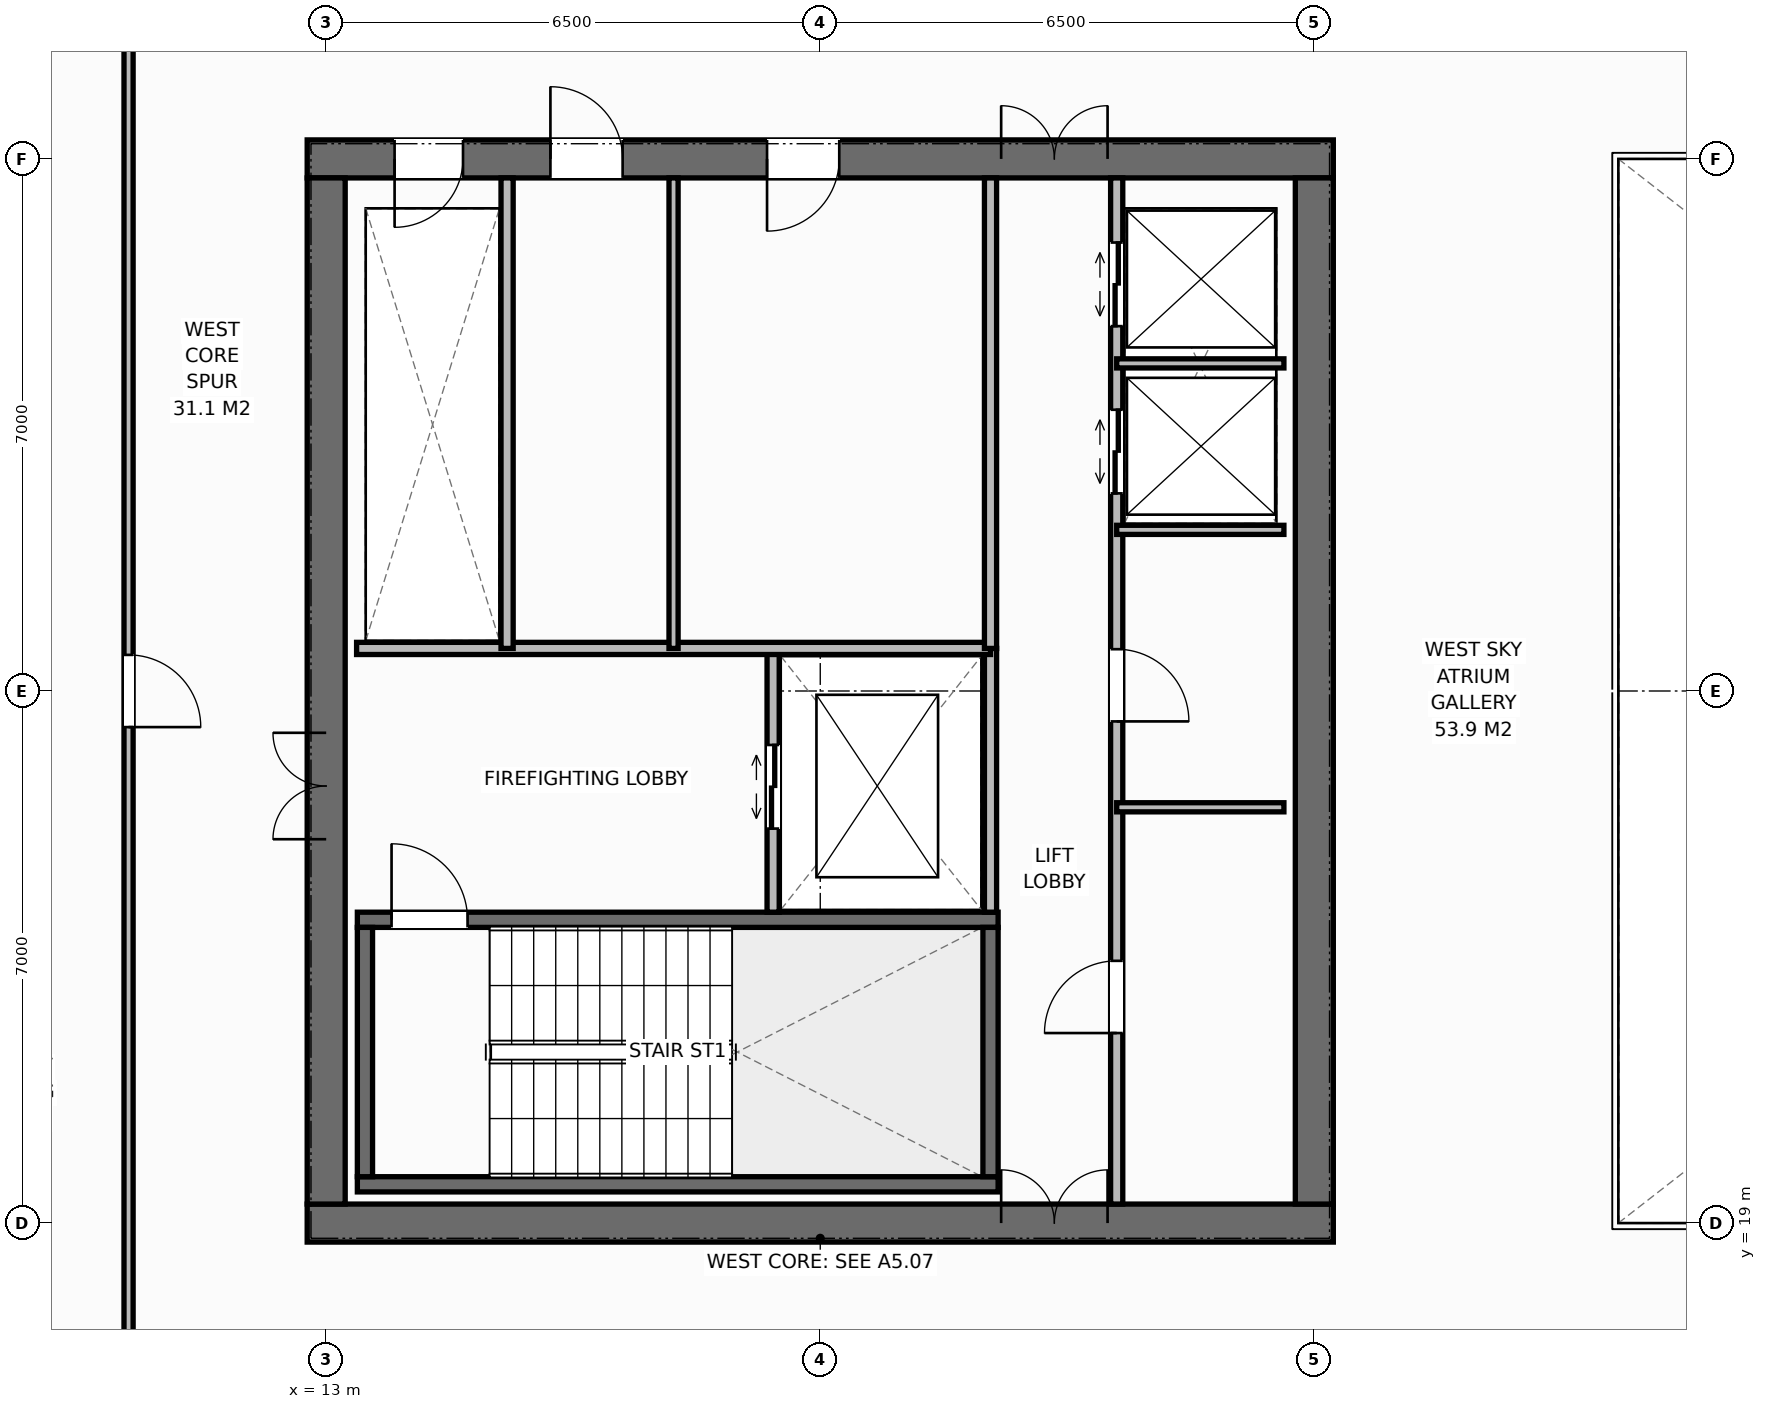
"""IFC4 building model, lengths in metres.
Left out: names, types, materials, properties, quantities, classifications, styles, units other than length and angle.
Written with IfcOpenShell. Run it as: python <this file> out.ifc"""

import sys

from ifc_helpers import new_model, si_unit, direction, frame, frame_2d, origin, place, context, subcontext, project, spatial, rectangle, extrude, element, fill, save


model = new_model("IFC4")
c1 = context("Model", 3, precision=1e-05, world=origin(), true_north=direction((0.0, 1.0)))
c2 = subcontext(c1, "Body", "Model", "MODEL_VIEW")
j1 = project(units=[si_unit("LENGTHUNIT", "METRE"), si_unit("PLANEANGLEUNIT", "RADIAN")], contexts=[c1])
p1 = place(None, origin())
s1 = spatial("IfcSite", under=j1, at=p1, CompositionType="ELEMENT")
p2 = place(p1, origin())
s2 = spatial("IfcBuilding", under=s1, at=p2, CompositionType="ELEMENT")
p3 = place(p2, frame((0.0, 0.0, 306.4)))
s3 = spatial("IfcBuildingStorey", under=s2, at=p3, CompositionType="ELEMENT", Elevation=306.4)
p4 = place(p3, frame((12.75, 19.0, 0.0), z_axis=(0.0, 0.0, 1.0), x_axis=(1.0, 0.0, 0.0)))
e1 = element("IfcWall", 1, at=p4, inside=s3, PredefinedType="SHEAR", context=c2, shape_type="SweptSolid", body=[
    extrude(rectangle(XDim=13.5, YDim=0.5, at=frame_2d((6.75, 0.0))), origin(), (0.0, 0.0, 1.0), 4.0),
])
p5 = place(p4, frame((9.13, 0.0, 0.0)))
e2 = element("IfcOpeningElement", 2, at=p5, cuts=e1, PredefinedType="OPENING", context=c2, shape_type="SweptSolid", body=[
    extrude(rectangle(XDim=1.4, YDim=2.2, at=frame_2d((0.7, 1.1))), frame((0.0, 0.26, 0.0), z_axis=(0.0, -1.0, 0.0), x_axis=(1.0, 0.0, 0.0)), (0.0, 0.0, 1.0), 0.52),
])
p6 = place(p3, frame((12.75, 33.0, 0.0), z_axis=(0.0, 0.0, 1.0), x_axis=(1.0, 0.0, 0.0)))
e3 = element("IfcWall", 3, at=p6, inside=s3, PredefinedType="SHEAR", context=c2, shape_type="SweptSolid", body=[
    extrude(rectangle(XDim=13.5, YDim=0.5, at=frame_2d((6.75, 0.0))), origin(), (0.0, 0.0, 1.0), 4.0),
])
p7 = place(p6, frame((1.15, 0.0, 0.0)))
e4 = element("IfcOpeningElement", 4, at=p7, cuts=e3, PredefinedType="OPENING", context=c2, shape_type="SweptSolid", body=[
    extrude(rectangle(XDim=0.9, YDim=2.15, at=frame_2d((0.45, 1.075))), frame((0.0, 0.26, 0.0), z_axis=(0.0, -1.0, 0.0), x_axis=(1.0, 0.0, 0.0)), (0.0, 0.0, 1.0), 0.52),
])
p8 = place(p6, frame((3.2, 0.0, 0.0)))
e5 = element("IfcOpeningElement", 5, at=p8, cuts=e3, PredefinedType="OPENING", context=c2, shape_type="SweptSolid", body=[
    extrude(rectangle(XDim=0.95, YDim=2.15, at=frame_2d((0.475, 1.075))), frame((0.0, 0.26, 0.0), z_axis=(0.0, -1.0, 0.0), x_axis=(1.0, 0.0, 0.0)), (0.0, 0.0, 1.0), 0.52),
])
p9 = place(p6, frame((6.05, 0.0, 0.0)))
e6 = element("IfcOpeningElement", 6, at=p9, cuts=e3, PredefinedType="OPENING", context=c2, shape_type="SweptSolid", body=[
    extrude(rectangle(XDim=0.95, YDim=2.15, at=frame_2d((0.475, 1.075))), frame((0.0, 0.26, 0.0), z_axis=(0.0, -1.0, 0.0), x_axis=(1.0, 0.0, 0.0)), (0.0, 0.0, 1.0), 0.52),
])
p10 = place(p6, frame((9.13, 0.0, 0.0)))
e7 = element("IfcOpeningElement", 7, at=p10, cuts=e3, PredefinedType="OPENING", context=c2, shape_type="SweptSolid", body=[
    extrude(rectangle(XDim=1.4, YDim=2.2, at=frame_2d((0.7, 1.1))), frame((0.0, 0.26, 0.0), z_axis=(0.0, -1.0, 0.0), x_axis=(1.0, 0.0, 0.0)), (0.0, 0.0, 1.0), 0.52),
])
p11 = place(p3, frame((13.0, 19.25, 0.0), z_axis=(0.0, 0.0, 1.0), x_axis=(0.0, 1.0, 0.0)))
e8 = element("IfcWall", 8, at=p11, inside=s3, PredefinedType="SHEAR", context=c2, shape_type="SweptSolid", body=[
    extrude(rectangle(XDim=13.5, YDim=0.5, at=frame_2d((6.75, 0.0))), origin(), (0.0, 0.0, 1.0), 4.0),
])
p12 = place(p11, frame((4.8, 0.0, 0.0)))
e9 = element("IfcOpeningElement", 9, at=p12, cuts=e8, PredefinedType="OPENING", context=c2, shape_type="SweptSolid", body=[
    extrude(rectangle(XDim=1.4, YDim=2.2, at=frame_2d((0.7, 1.1))), frame((0.0, 0.26, 0.0), z_axis=(0.0, -1.0, 0.0), x_axis=(1.0, 0.0, 0.0)), (0.0, 0.0, 1.0), 0.52),
])
p13 = place(p3, frame((26.0, 19.25, 0.0), z_axis=(0.0, 0.0, 1.0), x_axis=(0.0, 1.0, 0.0)))
e10 = element("IfcWall", 10, at=p13, inside=s3, PredefinedType="SHEAR", context=c2, shape_type="SweptSolid", body=[
    extrude(rectangle(XDim=13.5, YDim=0.5, at=frame_2d((6.75, 0.0))), origin(), (0.0, 0.0, 1.0), 4.0),
])
p14 = place(p3, frame((13.41, 19.51, 0.0), z_axis=(0.0, 0.0, 1.0), x_axis=(1.0, 0.0, 0.0)))
e11 = element("IfcWall", 11, at=p14, inside=s3, PredefinedType="SHEAR", context=c2, shape_type="SweptSolid", body=[
    extrude(rectangle(XDim=8.43, YDim=0.2, at=frame_2d((4.215, 0.0))), origin(), (0.0, 0.0, 1.0), 4.0),
])
p15 = place(p3, frame((13.41, 22.99, 0.0), z_axis=(0.0, 0.0, 1.0), x_axis=(1.0, 0.0, 0.0)))
e12 = element("IfcWall", 12, at=p15, inside=s3, PredefinedType="SHEAR", context=c2, shape_type="SweptSolid", body=[
    extrude(rectangle(XDim=8.43, YDim=0.2, at=frame_2d((4.215, 0.0))), origin(), (0.0, 0.0, 1.0), 4.0),
])
p16 = place(p15, frame((0.45, 0.0, 0.0)))
e13 = element("IfcOpeningElement", 13, at=p16, cuts=e12, PredefinedType="OPENING", context=c2, shape_type="SweptSolid", body=[
    extrude(rectangle(XDim=1.0, YDim=2.15, at=frame_2d((0.5, 1.075))), frame((0.0, 0.11, 0.0), z_axis=(0.0, -1.0, 0.0), x_axis=(1.0, 0.0, 0.0)), (0.0, 0.0, 1.0), 0.22),
])
for number, where, z_axis, x_axis in (
    (14, (13.51, 19.61, 0.0), (0.0, 0.0, 1.0), (0.0, 1.0, 0.0)),
    (15, (21.74, 19.61, 0.0), (0.0, 0.0, 1.0), (0.0, 1.0, 0.0)),
):
    element("IfcWall", number, at=place(p3, frame(where, z_axis=z_axis, x_axis=x_axis)), inside=s3, PredefinedType="SHEAR", context=c2, shape_type="SweptSolid", body=[
        extrude(rectangle(XDim=3.28, YDim=0.2, at=frame_2d((1.64, 0.0))), origin(), (0.0, 0.0, 1.0), 4.0),
    ])
p17 = place(p3, frame((21.74, 23.09, 0.0), z_axis=(0.0, 0.0, 1.0), x_axis=(0.0, 1.0, 0.0)))
e16 = element("IfcWall", 16, at=p17, inside=s3, PredefinedType="STANDARD", context=c2, shape_type="SweptSolid", body=[
    extrude(rectangle(XDim=3.47, YDim=0.16, at=frame_2d((1.735, 0.0))), origin(), (0.0, 0.0, 1.0), 3.72),
])
p18 = place(p3, frame((18.88, 23.09, 0.0), z_axis=(0.0, 0.0, 1.0), x_axis=(0.0, 1.0, 0.0)))
e17 = element("IfcWall", 17, at=p18, inside=s3, PredefinedType="STANDARD", context=c2, shape_type="SweptSolid", body=[
    extrude(rectangle(XDim=3.47, YDim=0.16, at=frame_2d((1.735, 0.0))), origin(), (0.0, 0.0, 1.0), 3.72),
])
p19 = place(p18, frame((1.1, 0.0, 0.0)))
e18 = element("IfcOpeningElement", 18, at=p19, cuts=e17, PredefinedType="OPENING", context=c2, shape_type="SweptSolid", body=[
    extrude(rectangle(XDim=1.1, YDim=2.2, at=frame_2d((0.55, 1.1))), frame((0.0, 0.09, 0.0), z_axis=(0.0, -1.0, 0.0), x_axis=(1.0, 0.0, 0.0)), (0.0, 0.0, 1.0), 0.18),
])
p20 = place(p3, frame((13.4, 26.56, 0.0), z_axis=(0.0, 0.0, 1.0), x_axis=(1.0, 0.0, 0.0)))
e19 = element("IfcWall", 19, at=p20, inside=s3, PredefinedType="STANDARD", context=c2, shape_type="SweptSolid", body=[
    extrude(rectangle(XDim=8.34, YDim=0.16, at=frame_2d((4.17, 0.0))), origin(), (0.0, 0.0, 1.0), 3.72),
])
p21 = place(p3, frame((15.38, 26.56, 0.0), z_axis=(0.0, 0.0, 1.0), x_axis=(0.0, 1.0, 0.0)))
e20 = element("IfcWall", 20, at=p21, inside=s3, PredefinedType="STANDARD", context=c2, shape_type="SweptSolid", body=[
    extrude(rectangle(XDim=6.19, YDim=0.16, at=frame_2d((3.095, 0.0))), origin(), (0.0, 0.0, 1.0), 3.72),
])
p22 = place(p3, frame((17.57, 26.56, 0.0), z_axis=(0.0, 0.0, 1.0), x_axis=(0.0, 1.0, 0.0)))
e21 = element("IfcWall", 21, at=p22, inside=s3, PredefinedType="PARTITIONING", context=c2, shape_type="SweptSolid", body=[
    extrude(rectangle(XDim=6.19, YDim=0.12, at=frame_2d((3.095, 0.0))), origin(), (0.0, 0.0, 1.0), 3.72),
])
p23 = place(p3, frame((21.74, 26.56, 0.0), z_axis=(0.0, 0.0, 1.0), x_axis=(0.0, 1.0, 0.0)))
e22 = element("IfcWall", 22, at=p23, inside=s3, PredefinedType="STANDARD", context=c2, shape_type="SweptSolid", body=[
    extrude(rectangle(XDim=6.19, YDim=0.16, at=frame_2d((3.095, 0.0))), origin(), (0.0, 0.0, 1.0), 3.72),
])
p24 = place(p3, frame((23.4, 19.25, 0.0), z_axis=(0.0, 0.0, 1.0), x_axis=(0.0, 1.0, 0.0)))
e23 = element("IfcWall", 23, at=p24, inside=s3, PredefinedType="STANDARD", context=c2, shape_type="SweptSolid", body=[
    extrude(rectangle(XDim=13.5, YDim=0.16, at=frame_2d((6.75, 0.0))), origin(), (0.0, 0.0, 1.0), 3.72),
])
p25 = place(p24, frame((2.25, 0.0, 0.0)))
e24 = element("IfcOpeningElement", 24, at=p25, cuts=e23, PredefinedType="OPENING", context=c2, shape_type="SweptSolid", body=[
    extrude(rectangle(XDim=0.95, YDim=2.15, at=frame_2d((0.475, 1.075))), frame((0.0, 0.09, 0.0), z_axis=(0.0, -1.0, 0.0), x_axis=(1.0, 0.0, 0.0)), (0.0, 0.0, 1.0), 0.18),
])
p26 = place(p24, frame((6.35, 0.0, 0.0)))
e25 = element("IfcOpeningElement", 25, at=p26, cuts=e23, PredefinedType="OPENING", context=c2, shape_type="SweptSolid", body=[
    extrude(rectangle(XDim=0.95, YDim=2.15, at=frame_2d((0.475, 1.075))), frame((0.0, 0.09, 0.0), z_axis=(0.0, -1.0, 0.0), x_axis=(1.0, 0.0, 0.0)), (0.0, 0.0, 1.0), 0.18),
])
p27 = place(p24, frame((9.35, 0.0, 0.0)))
e26 = element("IfcOpeningElement", 26, at=p27, cuts=e23, PredefinedType="OPENING", context=c2, shape_type="SweptSolid", body=[
    extrude(rectangle(XDim=1.1, YDim=2.2, at=frame_2d((0.55, 1.1))), frame((0.0, 0.09, 0.0), z_axis=(0.0, -1.0, 0.0), x_axis=(1.0, 0.0, 0.0)), (0.0, 0.0, 1.0), 0.18),
])
p28 = place(p24, frame((11.55, 0.0, 0.0)))
e27 = element("IfcOpeningElement", 27, at=p28, cuts=e23, PredefinedType="OPENING", context=c2, shape_type="SweptSolid", body=[
    extrude(rectangle(XDim=1.1, YDim=2.2, at=frame_2d((0.55, 1.1))), frame((0.0, 0.09, 0.0), z_axis=(0.0, -1.0, 0.0), x_axis=(1.0, 0.0, 0.0)), (0.0, 0.0, 1.0), 0.18),
])
for number, where, z_axis, x_axis in (
    (28, (23.4, 24.47, 0.0), (0.0, 0.0, 1.0), (1.0, 0.0, 0.0)),
    (29, (23.4, 28.12, 0.0), (0.0, 0.0, 1.0), (1.0, 0.0, 0.0)),
    (30, (23.4, 30.31, 0.0), (0.0, 0.0, 1.0), (1.0, 0.0, 0.0)),
):
    element("IfcWall", number, at=place(p3, frame(where, z_axis=z_axis, x_axis=x_axis)), inside=s3, PredefinedType="PARTITIONING", context=c2, shape_type="SweptSolid", body=[
        extrude(rectangle(XDim=2.2, YDim=0.12, at=frame_2d((1.1, 0.0))), origin(), (0.0, 0.0, 1.0), 3.72),
    ])
p29 = place(p3, frame((10.4, 16.5, 0.0), z_axis=(0.0, 0.0, 1.0), x_axis=(0.0, 1.0, 0.0)))
e31 = element("IfcWall", 31, at=p29, inside=s3, PredefinedType="PARTITIONING", context=c2, shape_type="SweptSolid", body=[
    extrude(rectangle(XDim=19.0, YDim=0.12, at=frame_2d((9.5, 0.0))), origin(), (0.0, 0.0, 1.0), 3.72),
])
p30 = place(p29, frame((9.025, 0.0, 0.0)))
e32 = element("IfcOpeningElement", 32, at=p30, cuts=e31, PredefinedType="OPENING", context=c2, shape_type="SweptSolid", body=[
    extrude(rectangle(XDim=0.95, YDim=2.15, at=frame_2d((0.475, 1.075))), frame((0.0, 0.07, 0.0), z_axis=(0.0, -1.0, 0.0), x_axis=(1.0, 0.0, 0.0)), (0.0, 0.0, 1.0), 0.14),
])
p31 = place(p16, origin())
e33 = element("IfcDoor", 33, at=p31, inside=s3, OperationType="SINGLE_SWING_LEFT", PredefinedType="DOOR", context=c2, shape_type="SweptSolid", body=[
    extrude(rectangle(XDim=1.0, YDim=2.15, at=frame_2d((0.5, 1.075))), frame((0.0, 0.025, 0.0), z_axis=(0.0, -1.0, 0.0), x_axis=(1.0, 0.0, 0.0)), (0.0, 0.0, 1.0), 0.05),
])
fill(e13, e33)
p32 = place(p12, origin())
e34 = element("IfcDoor", 34, at=p32, inside=s3, OperationType="DOUBLE_DOOR_SINGLE_SWING", PredefinedType="DOOR", context=c2, shape_type="SweptSolid", body=[
    extrude(rectangle(XDim=1.4, YDim=2.2, at=frame_2d((0.7, 1.1))), frame((0.0, 0.025, 0.0), z_axis=(0.0, -1.0, 0.0), x_axis=(1.0, 0.0, 0.0)), (0.0, 0.0, 1.0), 0.05),
])
fill(e9, e34)
p33 = place(p19, origin())
e35 = element("IfcDoor", 35, at=p33, inside=s3, OperationType="DOUBLE_DOOR_SLIDING", PredefinedType="DOOR", context=c2, shape_type="SweptSolid", body=[
    extrude(rectangle(XDim=1.1, YDim=2.2, at=frame_2d((0.55, 1.1))), frame((0.0, 0.025, 0.0), z_axis=(0.0, -1.0, 0.0), x_axis=(1.0, 0.0, 0.0)), (0.0, 0.0, 1.0), 0.05),
])
fill(e18, e35)
p34 = place(p7, origin())
e36 = element("IfcDoor", 36, at=p34, inside=s3, OperationType="SINGLE_SWING_RIGHT", PredefinedType="DOOR", context=c2, shape_type="SweptSolid", body=[
    extrude(rectangle(XDim=0.9, YDim=2.15, at=frame_2d((0.45, 1.075))), frame((0.0, -0.025, 0.0), z_axis=(0.0, -1.0, 0.0), x_axis=(1.0, 0.0, 0.0)), (0.0, 0.0, 1.0), 0.05),
])
fill(e4, e36)
p35 = place(p8, origin())
e37 = element("IfcDoor", 37, at=p35, inside=s3, OperationType="SINGLE_SWING_LEFT", PredefinedType="DOOR", context=c2, shape_type="SweptSolid", body=[
    extrude(rectangle(XDim=0.95, YDim=2.15, at=frame_2d((0.475, 1.075))), frame((0.0, -0.025, 0.0), z_axis=(0.0, -1.0, 0.0), x_axis=(1.0, 0.0, 0.0)), (0.0, 0.0, 1.0), 0.05),
])
fill(e5, e37)
p36 = place(p9, origin())
e38 = element("IfcDoor", 38, at=p36, inside=s3, OperationType="SINGLE_SWING_RIGHT", PredefinedType="DOOR", context=c2, shape_type="SweptSolid", body=[
    extrude(rectangle(XDim=0.95, YDim=2.15, at=frame_2d((0.475, 1.075))), frame((0.0, -0.025, 0.0), z_axis=(0.0, -1.0, 0.0), x_axis=(1.0, 0.0, 0.0)), (0.0, 0.0, 1.0), 0.05),
])
fill(e6, e38)
p37 = place(p5, origin())
e39 = element("IfcDoor", 39, at=p37, inside=s3, OperationType="DOUBLE_DOOR_SINGLE_SWING", PredefinedType="DOOR", context=c2, shape_type="SweptSolid", body=[
    extrude(rectangle(XDim=1.4, YDim=2.2, at=frame_2d((0.7, 1.1))), frame((0.0, 0.075, 0.0), z_axis=(0.0, -1.0, 0.0), x_axis=(1.0, 0.0, 0.0)), (0.0, 0.0, 1.0), 0.05),
])
fill(e2, e39)
p38 = place(p10, origin())
e40 = element("IfcDoor", 40, at=p38, inside=s3, OperationType="DOUBLE_DOOR_SINGLE_SWING", PredefinedType="DOOR", context=c2, shape_type="SweptSolid", body=[
    extrude(rectangle(XDim=1.4, YDim=2.2, at=frame_2d((0.7, 1.1))), frame((0.0, -0.025, 0.0), z_axis=(0.0, -1.0, 0.0), x_axis=(1.0, 0.0, 0.0)), (0.0, 0.0, 1.0), 0.05),
])
fill(e7, e40)
p39 = place(p25, origin())
e41 = element("IfcDoor", 41, at=p39, inside=s3, OperationType="SINGLE_SWING_LEFT", PredefinedType="DOOR", context=c2, shape_type="SweptSolid", body=[
    extrude(rectangle(XDim=0.95, YDim=2.15, at=frame_2d((0.475, 1.075))), frame((0.0, 0.025, 0.0), z_axis=(0.0, -1.0, 0.0), x_axis=(1.0, 0.0, 0.0)), (0.0, 0.0, 1.0), 0.05),
])
fill(e24, e41)
p40 = place(p26, origin())
e42 = element("IfcDoor", 42, at=p40, inside=s3, OperationType="SINGLE_SWING_RIGHT", PredefinedType="DOOR", context=c2, shape_type="SweptSolid", body=[
    extrude(rectangle(XDim=0.95, YDim=2.15, at=frame_2d((0.475, 1.075))), frame((0.0, 0.025, 0.0), z_axis=(0.0, -1.0, 0.0), x_axis=(1.0, 0.0, 0.0)), (0.0, 0.0, 1.0), 0.05),
])
fill(e25, e42)
p41 = place(p27, origin())
e43 = element("IfcDoor", 43, at=p41, inside=s3, OperationType="DOUBLE_DOOR_SLIDING", PredefinedType="DOOR", context=c2, shape_type="SweptSolid", body=[
    extrude(rectangle(XDim=1.1, YDim=2.2, at=frame_2d((0.55, 1.1))), frame((0.0, 0.025, 0.0), z_axis=(0.0, -1.0, 0.0), x_axis=(1.0, 0.0, 0.0)), (0.0, 0.0, 1.0), 0.05),
])
fill(e26, e43)
p42 = place(p28, origin())
e44 = element("IfcDoor", 44, at=p42, inside=s3, OperationType="DOUBLE_DOOR_SLIDING", PredefinedType="DOOR", context=c2, shape_type="SweptSolid", body=[
    extrude(rectangle(XDim=1.1, YDim=2.2, at=frame_2d((0.55, 1.1))), frame((0.0, 0.025, 0.0), z_axis=(0.0, -1.0, 0.0), x_axis=(1.0, 0.0, 0.0)), (0.0, 0.0, 1.0), 0.05),
])
fill(e27, e44)
p43 = place(p30, origin())
e45 = element("IfcDoor", 45, at=p43, inside=s3, OperationType="SINGLE_SWING_RIGHT", PredefinedType="DOOR", context=c2, shape_type="SweptSolid", body=[
    extrude(rectangle(XDim=0.95, YDim=2.15, at=frame_2d((0.475, 1.075))), frame((0.0, 0.025, 0.0), z_axis=(0.0, -1.0, 0.0), x_axis=(1.0, 0.0, 0.0)), (0.0, 0.0, 1.0), 0.05),
])
fill(e32, e45)
save(model, sys.argv[1])
